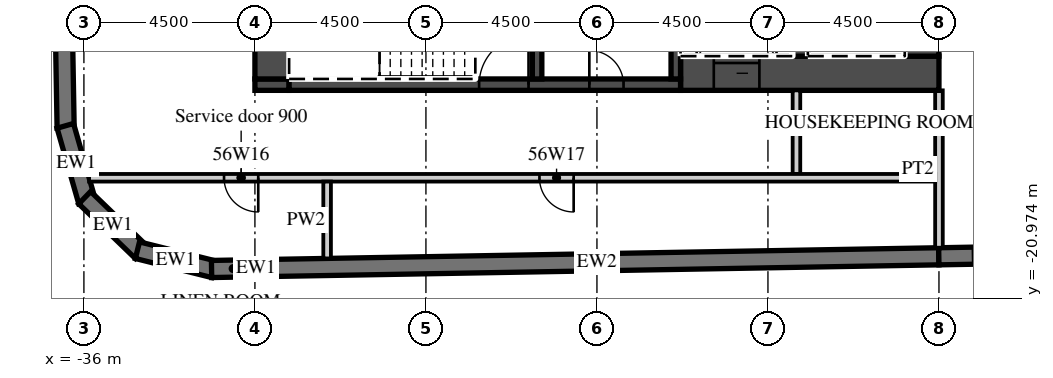
"""IFC4 building model, lengths in metres.
Left out: names, types, materials, properties, quantities, classifications, styles, units other than length and angle.
Written with IfcOpenShell. Run it as: python <this file> out.ifc"""

import sys

from ifc_helpers import new_model, si_unit, direction, frame, frame_2d, origin, place, context, subcontext, project, spatial, polyline, rectangle, outline, extrude, element, fill, save


model = new_model("IFC4")
c1 = context("Model", 3, precision=1e-05, world=origin(), true_north=direction((0.0, 1.0)))
c2 = subcontext(c1, "Body", "Model", "MODEL_VIEW")
j1 = project(units=[si_unit("LENGTHUNIT", "METRE"), si_unit("PLANEANGLEUNIT", "RADIAN")], contexts=[c1])
p1 = place(None, origin())
s1 = spatial("IfcSite", under=j1, at=p1, CompositionType="ELEMENT")
p2 = place(p1, origin())
s2 = spatial("IfcBuilding", under=s1, at=p2, CompositionType="ELEMENT")
p3 = place(p2, frame((0.0, 0.0, 230.9)))
s3 = spatial("IfcBuildingStorey", under=s2, at=p3, CompositionType="ELEMENT", Elevation=230.9)
p4 = place(p3, frame((-37.057, 16.503, 0.0), z_axis=(0.0, 0.0, 1.0), x_axis=(0.017452279857, -0.999847697366, 0.0)))
e1 = element("IfcWall", 1, at=p4, inside=s3, PredefinedType="SOLIDWALL", context=c2, shape_type="SweptSolid", body=[
    extrude(rectangle(XDim=33.0, YDim=0.45, at=frame_2d((16.5, 0.0))), origin(), (0.0, 0.0, 1.0), 3.02),
])
p5 = place(p3, frame((-36.49, -16.434, 0.0), z_axis=(0.0, 0.0, 1.0), x_axis=(0.275577603096, -0.961278827745, 0.0)))
e2 = element("IfcWall", 2, at=p5, inside=s3, PredefinedType="SOLIDWALL", context=c2, shape_type="SweptSolid", body=[
    extrude(outline(polyline([(0.0, -0.225), (2.071, -0.225), (1.95, 0.225), (0.121, 0.225), (0.0, -0.225)])), origin(), (0.0, 0.0, 1.0), 3.02),
])
p6 = place(p3, frame((-35.979, -18.324, 0.0), z_axis=(0.0, 0.0, 1.0), x_axis=(0.719320193998, -0.694678672846, 0.0)))
e3 = element("IfcWall", 3, at=p6, inside=s3, PredefinedType="SOLIDWALL", context=c2, shape_type="SweptSolid", body=[
    extrude(outline(polyline([(0.0, -0.225), (2.071, -0.225), (1.95, 0.225), (0.121, 0.225), (0.0, -0.225)])), origin(), (0.0, 0.0, 1.0), 3.02),
])
p7 = place(p3, frame((-34.591, -19.706, 0.0), z_axis=(0.0, 0.0, 1.0), x_axis=(0.970315655375, -0.241841950319, 0.0)))
e4 = element("IfcWall", 4, at=p7, inside=s3, PredefinedType="SOLIDWALL", context=c2, shape_type="SweptSolid", body=[
    extrude(outline(polyline([(0.0, -0.225), (2.071, -0.225), (1.95, 0.225), (0.121, 0.225), (0.0, -0.225)])), origin(), (0.0, 0.0, 1.0), 3.02),
])
p8 = place(p3, frame((-32.641, -20.2, 0.0), z_axis=(0.0, 0.0, 1.0), x_axis=(0.99984870815, 0.017394275206, 0.0)))
e5 = element("IfcWall", 5, at=p8, inside=s3, PredefinedType="SOLIDWALL", context=c2, shape_type="SweptSolid", body=[
    extrude(rectangle(XDim=1.137, YDim=0.45, at=frame_2d((0.568, 0.0))), origin(), (0.0, 0.0, 1.0), 3.02),
])
p9 = place(p3, frame((-31.504, -20.18, 0.0), z_axis=(0.0, 0.0, 1.0), x_axis=(0.999847677887, 0.017453395744, 0.0)))
e6 = element("IfcWall", 6, at=p9, inside=s3, PredefinedType="SOLIDWALL", context=c2, shape_type="SweptSolid", body=[
    extrude(rectangle(XDim=18.003, YDim=0.45, at=frame_2d((9.001, 0.0))), origin(), (0.0, 0.0, 1.0), 3.02),
])
p10 = place(p3, frame((-13.504, -19.866, 0.0), z_axis=(0.0, 0.0, 1.0), x_axis=(0.999847672978, 0.017453676992, 0.0)))
e7 = element("IfcWall", 7, at=p10, inside=s3, PredefinedType="SOLIDWALL", context=c2, shape_type="SweptSolid", body=[
    extrude(rectangle(XDim=52.86, YDim=0.45, at=frame_2d((26.43, 0.0))), origin(), (0.0, 0.0, 1.0), 3.02),
])
p11 = place(p10, frame((0.9, 0.0, 0.45)))
e8 = element("IfcOpeningElement", 8, at=p11, cuts=e7, PredefinedType="OPENING", context=c2, shape_type="SweptSolid", body=[
    extrude(rectangle(XDim=2.7, YDim=2.25, at=frame_2d((1.35, 1.125))), frame((0.0, 0.235, 0.0), z_axis=(0.0, -1.0, 0.0), x_axis=(1.0, 0.0, 0.0)), (0.0, 0.0, 1.0), 0.47),
])
p12 = place(p10, frame((5.401, 0.0, 0.45)))
e9 = element("IfcOpeningElement", 9, at=p12, cuts=e7, PredefinedType="OPENING", context=c2, shape_type="SweptSolid", body=[
    extrude(rectangle(XDim=2.7, YDim=2.25, at=frame_2d((1.35, 1.125))), frame((0.0, 0.235, 0.0), z_axis=(0.0, -1.0, 0.0), x_axis=(1.0, 0.0, 0.0)), (0.0, 0.0, 1.0), 0.47),
])
p13 = place(p10, frame((9.902, 0.0, 0.45)))
e10 = element("IfcOpeningElement", 10, at=p13, cuts=e7, PredefinedType="OPENING", context=c2, shape_type="SweptSolid", body=[
    extrude(rectangle(XDim=2.7, YDim=2.25, at=frame_2d((1.35, 1.125))), frame((0.0, 0.235, 0.0), z_axis=(0.0, -1.0, 0.0), x_axis=(1.0, 0.0, 0.0)), (0.0, 0.0, 1.0), 0.47),
])
p14 = place(p10, frame((14.402, 0.0, 0.45)))
e11 = element("IfcOpeningElement", 11, at=p14, cuts=e7, PredefinedType="OPENING", context=c2, shape_type="SweptSolid", body=[
    extrude(rectangle(XDim=2.7, YDim=2.25, at=frame_2d((1.35, 1.125))), frame((0.0, 0.235, 0.0), z_axis=(0.0, -1.0, 0.0), x_axis=(1.0, 0.0, 0.0)), (0.0, 0.0, 1.0), 0.47),
])
p15 = place(p10, frame((18.903, 0.0, 0.45)))
e12 = element("IfcOpeningElement", 12, at=p15, cuts=e7, PredefinedType="OPENING", context=c2, shape_type="SweptSolid", body=[
    extrude(rectangle(XDim=2.7, YDim=2.25, at=frame_2d((1.35, 1.125))), frame((0.0, 0.235, 0.0), z_axis=(0.0, -1.0, 0.0), x_axis=(1.0, 0.0, 0.0)), (0.0, 0.0, 1.0), 0.47),
])
p16 = place(p10, frame((23.404, 0.0, 0.45)))
e13 = element("IfcOpeningElement", 13, at=p16, cuts=e7, PredefinedType="OPENING", context=c2, shape_type="SweptSolid", body=[
    extrude(rectangle(XDim=2.7, YDim=2.25, at=frame_2d((1.35, 1.125))), frame((0.0, 0.235, 0.0), z_axis=(0.0, -1.0, 0.0), x_axis=(1.0, 0.0, 0.0)), (0.0, 0.0, 1.0), 0.47),
])
p17 = place(p10, frame((27.904, 0.0, 0.45)))
e14 = element("IfcOpeningElement", 14, at=p17, cuts=e7, PredefinedType="OPENING", context=c2, shape_type="SweptSolid", body=[
    extrude(rectangle(XDim=2.7, YDim=2.25, at=frame_2d((1.35, 1.125))), frame((0.0, 0.235, 0.0), z_axis=(0.0, -1.0, 0.0), x_axis=(1.0, 0.0, 0.0)), (0.0, 0.0, 1.0), 0.47),
])
p18 = place(p10, frame((32.405, 0.0, 0.45)))
e15 = element("IfcOpeningElement", 15, at=p18, cuts=e7, PredefinedType="OPENING", context=c2, shape_type="SweptSolid", body=[
    extrude(rectangle(XDim=2.7, YDim=2.25, at=frame_2d((1.35, 1.125))), frame((0.0, 0.235, 0.0), z_axis=(0.0, -1.0, 0.0), x_axis=(1.0, 0.0, 0.0)), (0.0, 0.0, 1.0), 0.47),
])
p19 = place(p10, frame((36.906, 0.0, 0.45)))
e16 = element("IfcOpeningElement", 16, at=p19, cuts=e7, PredefinedType="OPENING", context=c2, shape_type="SweptSolid", body=[
    extrude(rectangle(XDim=2.7, YDim=2.25, at=frame_2d((1.35, 1.125))), frame((0.0, 0.235, 0.0), z_axis=(0.0, -1.0, 0.0), x_axis=(1.0, 0.0, 0.0)), (0.0, 0.0, 1.0), 0.47),
])
p20 = place(p10, frame((41.406, 0.0, 0.45)))
e17 = element("IfcOpeningElement", 17, at=p20, cuts=e7, PredefinedType="OPENING", context=c2, shape_type="SweptSolid", body=[
    extrude(rectangle(XDim=2.7, YDim=2.25, at=frame_2d((1.35, 1.125))), frame((0.0, 0.235, 0.0), z_axis=(0.0, -1.0, 0.0), x_axis=(1.0, 0.0, 0.0)), (0.0, 0.0, 1.0), 0.47),
])
p21 = place(p10, frame((45.907, 0.0, 0.45)))
e18 = element("IfcOpeningElement", 18, at=p21, cuts=e7, PredefinedType="OPENING", context=c2, shape_type="SweptSolid", body=[
    extrude(rectangle(XDim=2.7, YDim=2.25, at=frame_2d((1.35, 1.125))), frame((0.0, 0.235, 0.0), z_axis=(0.0, -1.0, 0.0), x_axis=(1.0, 0.0, 0.0)), (0.0, 0.0, 1.0), 0.47),
])
p22 = place(p3, frame((-13.5, -19.641, 0.0), z_axis=(0.0, 0.0, 1.0), x_axis=(0.0, 1.0, 0.0)))
e19 = element("IfcWall", 19, at=p22, inside=s3, PredefinedType="PARTITIONING", context=c2, shape_type="SweptSolid", body=[
    extrude(rectangle(XDim=4.141, YDim=0.2, at=frame_2d((2.071, 0.0))), origin(), (0.0, 0.0, 1.0), 3.02),
])
p23 = place(p3, frame((-20.3, -15.05, 0.0), z_axis=(0.0, 0.0, 1.0), x_axis=(1.0, 0.0, 0.0)))
e20 = element("IfcWall", 20, at=p23, inside=s3, PredefinedType="SHEAR", context=c2, shape_type="SweptSolid", body=[
    extrude(rectangle(XDim=6.8, YDim=0.9, at=frame_2d((3.4, 0.0))), origin(), (0.0, 0.0, 1.0), 3.02),
])
p24 = place(p23, frame((0.875, 0.0, 0.0)))
e21 = element("IfcOpeningElement", 21, at=p24, cuts=e20, PredefinedType="OPENING", context=c2, shape_type="SweptSolid", body=[
    extrude(rectangle(XDim=1.2, YDim=2.1, at=frame_2d((0.6, 1.05))), frame((0.0, 0.46, 0.0), z_axis=(0.0, -1.0, 0.0), x_axis=(1.0, 0.0, 0.0)), (0.0, 0.0, 1.0), 0.92),
])
p25 = place(p3, frame((-31.5, -15.35, 0.0), z_axis=(0.0, 0.0, 1.0), x_axis=(1.0, 0.0, 0.0)))
e22 = element("IfcWall", 22, at=p25, inside=s3, PredefinedType="SHEAR", context=c2, shape_type="SweptSolid", body=[
    extrude(rectangle(XDim=0.9, YDim=0.3, at=frame_2d((0.45, 0.0))), origin(), (0.0, 0.0, 1.0), 3.02),
])
p26 = place(p3, frame((-30.6, -15.35, 0.0), z_axis=(0.0, 0.0, 1.0), x_axis=(1.0, 0.0, 0.0)))
e23 = element("IfcWall", 23, at=p26, inside=s3, PredefinedType="SHEAR", context=c2, shape_type="SweptSolid", body=[
    extrude(rectangle(XDim=10.3, YDim=0.3, at=frame_2d((5.15, 0.0))), origin(), (0.0, 0.0, 1.0), 3.02),
])
p27 = place(p26, frame((5.0, 0.0, 0.0)))
e24 = element("IfcOpeningElement", 24, at=p27, cuts=e23, PredefinedType="OPENING", context=c2, shape_type="SweptSolid", body=[
    extrude(rectangle(XDim=1.3, YDim=2.1, at=frame_2d((0.65, 1.05))), frame((0.0, 0.16, 0.0), z_axis=(0.0, -1.0, 0.0), x_axis=(1.0, 0.0, 0.0)), (0.0, 0.0, 1.0), 0.32),
])
p28 = place(p26, frame((7.9, 0.0, 0.0)))
e25 = element("IfcOpeningElement", 25, at=p28, cuts=e23, PredefinedType="OPENING", context=c2, shape_type="SweptSolid", body=[
    extrude(rectangle(XDim=0.9, YDim=2.1, at=frame_2d((0.45, 1.05))), frame((0.0, 0.16, 0.0), z_axis=(0.0, -1.0, 0.0), x_axis=(1.0, 0.0, 0.0)), (0.0, 0.0, 1.0), 0.32),
])
p29 = place(p3, frame((-31.05, -15.2, 0.0), z_axis=(0.0, 0.0, 1.0), x_axis=(0.0, 1.0, 0.0)))
e26 = element("IfcWall", 26, at=p29, inside=s3, PredefinedType="SHEAR", context=c2, shape_type="SweptSolid", body=[
    extrude(rectangle(XDim=12.8, YDim=0.9, at=frame_2d((6.4, 0.0))), origin(), (0.0, 0.0, 1.0), 3.02),
])
p30 = place(p29, frame((11.5, 0.0, 0.0)))
e27 = element("IfcOpeningElement", 27, at=p30, cuts=e26, PredefinedType="OPENING", context=c2, shape_type="SweptSolid", body=[
    extrude(rectangle(XDim=1.1, YDim=2.1, at=frame_2d((0.55, 1.05))), frame((0.0, 0.46, 0.0), z_axis=(0.0, -1.0, 0.0), x_axis=(1.0, 0.0, 0.0)), (0.0, 0.0, 1.0), 0.92),
])
p31 = place(p3, frame((-13.95, -14.6, 0.0), z_axis=(0.0, 0.0, 1.0), x_axis=(0.0, 1.0, 0.0)))
e28 = element("IfcWall", 28, at=p31, inside=s3, PredefinedType="SHEAR", context=c2, shape_type="SweptSolid", body=[
    extrude(rectangle(XDim=12.2, YDim=0.9, at=frame_2d((6.1, 0.0))), origin(), (0.0, 0.0, 1.0), 3.02),
])
p32 = place(p3, frame((-17.15, -14.6, 0.0), z_axis=(0.0, 0.0, 1.0), x_axis=(0.0, 1.0, 0.0)))
e29 = element("IfcWall", 29, at=p32, inside=s3, PredefinedType="SHEAR", context=c2, shape_type="SweptSolid", body=[
    extrude(rectangle(XDim=5.8, YDim=0.4, at=frame_2d((2.9, 0.0))), origin(), (0.0, 0.0, 1.0), 3.02),
])
for number, where, z_axis, x_axis in (
    (30, (-20.425, -15.2, 0.0), (0.0, 0.0, 1.0), (0.0, 1.0, 0.0)),
    (31, (-24.075, -15.2, 0.0), (0.0, 0.0, 1.0), (0.0, 1.0, 0.0)),
):
    element("IfcWall", number, at=place(p3, frame(where, z_axis=z_axis, x_axis=x_axis)), inside=s3, PredefinedType="SHEAR", context=c2, shape_type="SweptSolid", body=[
        extrude(rectangle(XDim=3.25, YDim=0.25, at=frame_2d((1.625, 0.0))), origin(), (0.0, 0.0, 1.0), 3.02),
    ])
p33 = place(p3, frame((-17.25, -17.7, 0.0), z_axis=(0.0, 0.0, 1.0), x_axis=(0.0, 1.0, 0.0)))
e32 = element("IfcWall", 32, at=p33, inside=s3, PredefinedType="PARTITIONING", context=c2, shape_type="SweptSolid", body=[
    extrude(rectangle(XDim=2.2, YDim=0.2, at=frame_2d((1.1, 0.0))), origin(), (0.0, 0.0, 1.0), 3.02),
])
p34 = place(p3, frame((-35.864, -17.8, 0.0), z_axis=(0.0, 0.0, 1.0), x_axis=(1.0, 0.0, 0.0)))
e33 = element("IfcWall", 33, at=p34, inside=s3, PredefinedType="PARTITIONING", context=c2, shape_type="SweptSolid", body=[
    extrude(rectangle(XDim=22.264, YDim=0.2, at=frame_2d((11.132, 0.0))), origin(), (0.0, 0.0, 1.0), 3.02),
])
p35 = place(p34, frame((3.551, 0.0, 0.0)))
e34 = element("IfcOpeningElement", 34, at=p35, cuts=e33, PredefinedType="OPENING", context=c2, shape_type="SweptSolid", body=[
    extrude(rectangle(XDim=0.9, YDim=2.1, at=frame_2d((0.45, 1.05))), frame((0.0, 0.11, 0.0), z_axis=(0.0, -1.0, 0.0), x_axis=(1.0, 0.0, 0.0)), (0.0, 0.0, 1.0), 0.22),
])
p36 = place(p34, frame((11.851, 0.0, 0.0)))
e35 = element("IfcOpeningElement", 35, at=p36, cuts=e33, PredefinedType="OPENING", context=c2, shape_type="SweptSolid", body=[
    extrude(rectangle(XDim=0.9, YDim=2.1, at=frame_2d((0.45, 1.05))), frame((0.0, 0.11, 0.0), z_axis=(0.0, -1.0, 0.0), x_axis=(1.0, 0.0, 0.0)), (0.0, 0.0, 1.0), 0.22),
])
p37 = place(p3, frame((-29.6, -19.922, 0.0), z_axis=(0.0, 0.0, 1.0), x_axis=(0.0, 1.0, 0.0)))
e36 = element("IfcWall", 36, at=p37, inside=s3, PredefinedType="PARTITIONING", context=c2, shape_type="SweptSolid", body=[
    extrude(rectangle(XDim=2.022, YDim=0.2, at=frame_2d((1.011, 0.0))), origin(), (0.0, 0.0, 1.0), 3.02),
])
p38 = place(p11, origin())
e37 = element("IfcWindow", 37, at=p38, inside=s3, PartitioningType="SINGLE_PANEL", PredefinedType="WINDOW", context=c2, shape_type="SweptSolid", body=[
    extrude(rectangle(XDim=2.7, YDim=2.25, at=frame_2d((1.35, 1.125))), frame((0.0, 0.09, 0.0), z_axis=(0.0, -1.0, 0.0), x_axis=(1.0, 0.0, 0.0)), (0.0, 0.0, 1.0), 0.06),
])
fill(e8, e37)
p39 = place(p24, origin())
e38 = element("IfcDoor", 38, at=p39, inside=s3, OperationType="SLIDING_TO_LEFT", PredefinedType="DOOR", context=c2, shape_type="SweptSolid", body=[
    extrude(rectangle(XDim=1.2, YDim=2.1, at=frame_2d((0.6, 1.05))), frame((0.0, 0.025, 0.0), z_axis=(0.0, -1.0, 0.0), x_axis=(1.0, 0.0, 0.0)), (0.0, 0.0, 1.0), 0.05),
])
fill(e21, e38)
p40 = place(p27, origin())
e39 = element("IfcDoor", 39, at=p40, inside=s3, OperationType="SINGLE_SWING_RIGHT", PredefinedType="DOOR", context=c2, shape_type="SweptSolid", body=[
    extrude(rectangle(XDim=1.3, YDim=2.1, at=frame_2d((0.65, 1.05))), frame((0.0, 0.025, 0.0), z_axis=(0.0, -1.0, 0.0), x_axis=(1.0, 0.0, 0.0)), (0.0, 0.0, 1.0), 0.05),
])
fill(e24, e39)
p41 = place(p28, origin())
e40 = element("IfcDoor", 40, at=p41, inside=s3, OperationType="SINGLE_SWING_LEFT", PredefinedType="DOOR", context=c2, shape_type="SweptSolid", body=[
    extrude(rectangle(XDim=0.9, YDim=2.1, at=frame_2d((0.45, 1.05))), frame((0.0, 0.025, 0.0), z_axis=(0.0, -1.0, 0.0), x_axis=(1.0, 0.0, 0.0)), (0.0, 0.0, 1.0), 0.05),
])
fill(e25, e40)
p42 = place(p35, origin())
e41 = element("IfcDoor", 41, at=p42, inside=s3, OperationType="SINGLE_SWING_RIGHT", PredefinedType="DOOR", context=c2, shape_type="SweptSolid", body=[
    extrude(rectangle(XDim=0.9, YDim=2.1, at=frame_2d((0.45, 1.05))), frame((0.0, 0.025, 0.0), z_axis=(0.0, -1.0, 0.0), x_axis=(1.0, 0.0, 0.0)), (0.0, 0.0, 1.0), 0.05),
])
fill(e34, e41)
p43 = place(p36, origin())
e42 = element("IfcDoor", 42, at=p43, inside=s3, OperationType="SINGLE_SWING_RIGHT", PredefinedType="DOOR", context=c2, shape_type="SweptSolid", body=[
    extrude(rectangle(XDim=0.9, YDim=2.1, at=frame_2d((0.45, 1.05))), frame((0.0, 0.025, 0.0), z_axis=(0.0, -1.0, 0.0), x_axis=(1.0, 0.0, 0.0)), (0.0, 0.0, 1.0), 0.05),
])
fill(e35, e42)
save(model, sys.argv[1])
